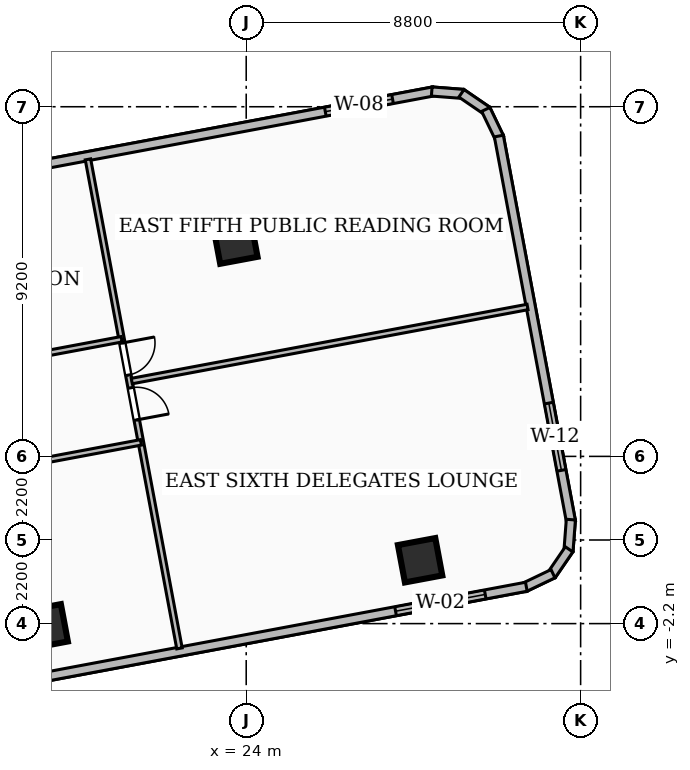
"""IFC4 building model, lengths in metres.
Left out: names, types, materials, properties, quantities, classifications, styles, units other than length and angle.
Written with IfcOpenShell. Run it as: python <this file> out.ifc"""

import sys

from ifc_helpers import new_model, si_unit, direction, frame, frame_2d, origin, origin_2d, place, context, subcontext, project, spatial, rectangle, extrude, element, fill, save


model = new_model("IFC4")
c1 = context("Model", 3, precision=1e-05, world=origin(), true_north=direction((0.0, 1.0)))
c2 = subcontext(c1, "Body", "Model", "MODEL_VIEW")
j1 = project(units=[si_unit("LENGTHUNIT", "METRE"), si_unit("PLANEANGLEUNIT", "RADIAN")], contexts=[c1])
p1 = place(None, origin())
s1 = spatial("IfcSite", under=j1, at=p1, CompositionType="ELEMENT")
p2 = place(p1, origin())
s2 = spatial("IfcBuilding", under=s1, at=p2, CompositionType="ELEMENT")
p3 = place(p2, frame((0.0, 0.0, 100.08)))
s3 = spatial("IfcBuildingStorey", under=s2, at=p3, CompositionType="ELEMENT", Elevation=100.08)
for number, where, z_axis, x_axis in (
    (1, (18.724, -2.271, 0.0), (0.0, 0.0, 1.0), (0.983, 0.184, 0.0)),
    (2, (28.576, -0.533, 0.0), (0.0, 0.0, 1.0), (0.983, 0.184, 0.0)),
    (3, (23.715, 7.851, 0.0), (0.0, 0.0, 1.0), (0.983, 0.184, 0.0)),
):
    element("IfcColumn", number, at=place(p3, frame(where, z_axis=z_axis, x_axis=x_axis)), inside=s3, PredefinedType="COLUMN", context=c2, shape_type="SweptSolid", body=[
        extrude(rectangle(XDim=1.0, YDim=1.0, at=origin_2d()), origin(), (0.0, 0.0, 1.0), 3.6),
    ])
p4 = place(p3, frame((12.935, 8.809, 0.0), z_axis=(0.0, 0.0, 1.0), x_axis=(0.982922588066, 0.184019525782, 0.0)))
e4 = element("IfcWall", 4, at=p4, inside=s3, PredefinedType="SOLIDWALL", context=c2, shape_type="SweptSolid", body=[
    extrude(rectangle(XDim=16.275, YDim=0.24, at=frame_2d((8.137, 0.0))), origin(), (0.0, 0.0, 1.0), 3.34),
])
p5 = place(p4, frame((13.375, 0.0, 0.85)))
e5 = element("IfcOpeningElement", 5, at=p5, cuts=e4, PredefinedType="OPENING", context=c2, shape_type="SweptSolid", body=[
    extrude(rectangle(XDim=1.8, YDim=1.8, at=frame_2d((0.9, 0.9))), frame((0.0, 0.13, 0.0), z_axis=(0.0, -1.0, 0.0), x_axis=(1.0, 0.0, 0.0)), (0.0, 0.0, 1.0), 0.26),
])
p6 = place(p3, frame((28.882, 11.801, 0.0), z_axis=(0.0, 0.0, 1.0), x_axis=(0.997028485347, -0.077033754987, 0.0)))
e6 = element("IfcWall", 6, at=p6, inside=s3, PredefinedType="SOLIDWALL", context=c2, shape_type="SweptSolid", body=[
    extrude(rectangle(XDim=0.83, YDim=0.24, at=frame_2d((0.415, 0.0))), origin(), (0.0, 0.0, 1.0), 3.34),
])
p7 = place(p3, frame((29.664, 11.753, 0.0), z_axis=(0.0, 0.0, 1.0), x_axis=(0.825160141847, -0.564898876177, 0.0)))
e7 = element("IfcWall", 7, at=p7, inside=s3, PredefinedType="SOLIDWALL", context=c2, shape_type="SweptSolid", body=[
    extrude(rectangle(XDim=0.814, YDim=0.24, at=frame_2d((0.407, 0.0))), origin(), (0.0, 0.0, 1.0), 3.34),
])
p8 = place(p3, frame((30.304, 11.33, 0.0), z_axis=(0.0, 0.0, 1.0), x_axis=(0.433294434868, -0.901252424525, 0.0)))
e8 = element("IfcWall", 8, at=p8, inside=s3, PredefinedType="SOLIDWALL", context=c2, shape_type="SweptSolid", body=[
    extrude(rectangle(XDim=0.831, YDim=0.24, at=frame_2d((0.416, 0.0))), origin(), (0.0, 0.0, 1.0), 3.34),
])
p9 = place(p3, frame((30.648, 10.629, 0.0), z_axis=(0.0, 0.0, 1.0), x_axis=(0.183929967783, -0.982939350597, 0.0)))
e9 = element("IfcWall", 9, at=p9, inside=s3, PredefinedType="SOLIDWALL", context=c2, shape_type="SweptSolid", body=[
    extrude(rectangle(XDim=10.319, YDim=0.24, at=frame_2d((5.159, 0.0))), origin(), (0.0, 0.0, 1.0), 3.34),
])
p10 = place(p9, frame((7.149, 0.0, 0.85)))
e10 = element("IfcOpeningElement", 10, at=p10, cuts=e9, PredefinedType="OPENING", context=c2, shape_type="SweptSolid", body=[
    extrude(rectangle(XDim=1.8, YDim=1.6, at=frame_2d((0.9, 0.8))), frame((0.0, 0.13, 0.0), z_axis=(0.0, -1.0, 0.0), x_axis=(1.0, 0.0, 0.0)), (0.0, 0.0, 1.0), 0.26),
])
p11 = place(p3, frame((32.543, 0.536, 0.0), z_axis=(0.0, 0.0, 1.0), x_axis=(-0.07586448817, -0.997118137151, 0.0)))
e11 = element("IfcWall", 11, at=p11, inside=s3, PredefinedType="SOLIDWALL", context=c2, shape_type="SweptSolid", body=[
    extrude(rectangle(XDim=0.83, YDim=0.24, at=frame_2d((0.415, 0.0))), origin(), (0.0, 0.0, 1.0), 3.34),
])
p12 = place(p3, frame((32.496, -0.246, 0.0), z_axis=(0.0, 0.0, 1.0), x_axis=(-0.56454433247, -0.825402748163, 0.0)))
e12 = element("IfcWall", 12, at=p12, inside=s3, PredefinedType="SOLIDWALL", context=c2, shape_type="SweptSolid", body=[
    extrude(rectangle(XDim=0.815, YDim=0.24, at=frame_2d((0.408, 0.0))), origin(), (0.0, 0.0, 1.0), 3.34),
])
p13 = place(p3, frame((32.073, -0.887, 0.0), z_axis=(0.0, 0.0, 1.0), x_axis=(-0.901930409836, -0.431881390908, 0.0)))
e13 = element("IfcWall", 13, at=p13, inside=s3, PredefinedType="SOLIDWALL", context=c2, shape_type="SweptSolid", body=[
    extrude(rectangle(XDim=0.832, YDim=0.24, at=frame_2d((0.416, 0.0))), origin(), (0.0, 0.0, 1.0), 3.34),
])
p14 = place(p3, frame((31.371, -1.23, 0.0), z_axis=(0.0, 0.0, 1.0), x_axis=(-0.982920382654, -0.18403130539, 0.0)))
e14 = element("IfcWall", 14, at=p14, inside=s3, PredefinedType="SOLIDWALL", context=c2, shape_type="SweptSolid", body=[
    extrude(rectangle(XDim=16.275, YDim=0.24, at=frame_2d((8.138, 0.0))), origin(), (0.0, 0.0, 1.0), 3.34),
])
p15 = place(p14, frame((1.1, 0.0, 0.85)))
e15 = element("IfcOpeningElement", 15, at=p15, cuts=e14, PredefinedType="OPENING", context=c2, shape_type="SweptSolid", body=[
    extrude(rectangle(XDim=2.4, YDim=2.1, at=frame_2d((1.2, 1.05))), frame((0.0, 0.13, 0.0), z_axis=(0.0, -1.0, 0.0), x_axis=(1.0, 0.0, 0.0)), (0.0, 0.0, 1.0), 0.26),
])
p16 = place(p3, frame((20.722, 5.282, 0.0), z_axis=(0.0, 0.0, 1.0), x_axis=(-0.982936027627, -0.183947725163, 0.0)))
e16 = element("IfcWall", 16, at=p16, inside=s3, PredefinedType="PARTITIONING", context=c2, shape_type="SweptSolid", body=[
    extrude(rectangle(XDim=7.05, YDim=0.145, at=frame_2d((3.525, 0.0))), origin(), (0.0, 0.0, 1.0), 3.34),
])
p17 = place(p16, frame((3.075, 0.0, 0.0)))
e17 = element("IfcOpeningElement", 17, at=p17, cuts=e16, PredefinedType="OPENING", context=c2, shape_type="SweptSolid", body=[
    extrude(rectangle(XDim=0.95, YDim=2.08, at=frame_2d((0.475, 1.04))), frame((0.0, 0.083, 0.0), z_axis=(0.0, -1.0, 0.0), x_axis=(1.0, 0.0, 0.0)), (0.0, 0.0, 1.0), 0.165),
])
p18 = place(p3, frame((14.3, 1.272, 0.0), z_axis=(0.0, 0.0, 1.0), x_axis=(0.98292976592, 0.183981181833, 0.0)))
e18 = element("IfcWall", 18, at=p18, inside=s3, PredefinedType="PARTITIONING", context=c2, shape_type="SweptSolid", body=[
    extrude(rectangle(XDim=7.05, YDim=0.145, at=frame_2d((3.525, 0.0))), origin(), (0.0, 0.0, 1.0), 3.34),
])
p19 = place(p18, frame((3.075, 0.0, 0.0)))
e19 = element("IfcOpeningElement", 19, at=p19, cuts=e18, PredefinedType="OPENING", context=c2, shape_type="SweptSolid", body=[
    extrude(rectangle(XDim=0.95, YDim=2.08, at=frame_2d((0.475, 1.04))), frame((0.0, 0.083, 0.0), z_axis=(0.0, -1.0, 0.0), x_axis=(1.0, 0.0, 0.0)), (0.0, 0.0, 1.0), 0.165),
])
p20 = place(p3, frame((20.989, 4.182, 0.0), z_axis=(0.0, 0.0, 1.0), x_axis=(0.982930571593, 0.183976877429, 0.0)))
e20 = element("IfcWall", 20, at=p20, inside=s3, PredefinedType="PARTITIONING", context=c2, shape_type="SweptSolid", body=[
    extrude(rectangle(XDim=10.595, YDim=0.145, at=frame_2d((5.297, 0.0))), origin(), (0.0, 0.0, 1.0), 2.832),
])
p21 = place(p3, frame((19.836, 10.015, 0.0), z_axis=(0.0, 0.0, 1.0), x_axis=(0.183949578206, -0.982935680845, 0.0)))
e21 = element("IfcWall", 21, at=p21, inside=s3, PredefinedType="PARTITIONING", context=c2, shape_type="SweptSolid", body=[
    extrude(rectangle(XDim=13.09, YDim=0.145, at=frame_2d((6.545, 0.0))), origin(), (0.0, 0.0, 1.0), 2.486),
])
p22 = place(p21, frame((6.115, 0.0, 0.0)))
e22 = element("IfcOpeningElement", 22, at=p22, cuts=e21, PredefinedType="OPENING", context=c2, shape_type="SweptSolid", body=[
    extrude(rectangle(XDim=0.86, YDim=2.04, at=frame_2d((0.43, 1.02))), frame((0.0, 0.083, 0.0), z_axis=(0.0, -1.0, 0.0), x_axis=(1.0, 0.0, 0.0)), (0.0, 0.0, 1.0), 0.165),
])
p23 = place(p21, frame((4.915, 0.0, 0.0)))
e23 = element("IfcOpeningElement", 23, at=p23, cuts=e21, PredefinedType="OPENING", context=c2, shape_type="SweptSolid", body=[
    extrude(rectangle(XDim=0.86, YDim=2.04, at=frame_2d((0.43, 1.02))), frame((0.0, 0.083, 0.0), z_axis=(0.0, -1.0, 0.0), x_axis=(1.0, 0.0, 0.0)), (0.0, 0.0, 1.0), 0.165),
])
p24 = place(p5, origin())
e24 = element("IfcWindow", 24, at=p24, inside=s3, PartitioningType="SINGLE_PANEL", PredefinedType="WINDOW", context=c2, shape_type="SweptSolid", body=[
    extrude(rectangle(XDim=1.8, YDim=1.8, at=frame_2d((0.9, 0.9))), frame((0.0, 0.03, 0.0), z_axis=(0.0, -1.0, 0.0), x_axis=(1.0, 0.0, 0.0)), (0.0, 0.0, 1.0), 0.06),
])
fill(e5, e24)
p25 = place(p10, origin())
e25 = element("IfcWindow", 25, at=p25, inside=s3, PartitioningType="SINGLE_PANEL", PredefinedType="WINDOW", context=c2, shape_type="SweptSolid", body=[
    extrude(rectangle(XDim=1.8, YDim=1.6, at=frame_2d((0.9, 0.8))), frame((0.0, 0.03, 0.0), z_axis=(0.0, -1.0, 0.0), x_axis=(1.0, 0.0, 0.0)), (0.0, 0.0, 1.0), 0.06),
])
fill(e10, e25)
p26 = place(p15, origin())
e26 = element("IfcWindow", 26, at=p26, inside=s3, PartitioningType="SINGLE_PANEL", PredefinedType="WINDOW", context=c2, shape_type="SweptSolid", body=[
    extrude(rectangle(XDim=2.4, YDim=2.1, at=frame_2d((1.2, 1.05))), frame((0.0, 0.03, 0.0), z_axis=(0.0, -1.0, 0.0), x_axis=(1.0, 0.0, 0.0)), (0.0, 0.0, 1.0), 0.06),
])
fill(e15, e26)
p27 = place(p22, origin())
e27 = element("IfcDoor", 27, at=p27, inside=s3, OperationType="SINGLE_SWING_RIGHT", PredefinedType="DOOR", context=c2, shape_type="SweptSolid", body=[
    extrude(rectangle(XDim=0.86, YDim=2.04, at=frame_2d((0.43, 1.02))), frame((0.0, 0.025, 0.0), z_axis=(0.0, -1.0, 0.0), x_axis=(1.0, 0.0, 0.0)), (0.0, 0.0, 1.0), 0.05),
])
fill(e22, e27)
p28 = place(p23, origin())
e28 = element("IfcDoor", 28, at=p28, inside=s3, OperationType="SINGLE_SWING_LEFT", PredefinedType="DOOR", context=c2, shape_type="SweptSolid", body=[
    extrude(rectangle(XDim=0.86, YDim=2.04, at=frame_2d((0.43, 1.02))), frame((0.0, 0.025, 0.0), z_axis=(0.0, -1.0, 0.0), x_axis=(1.0, 0.0, 0.0)), (0.0, 0.0, 1.0), 0.05),
])
fill(e23, e28)
save(model, sys.argv[1])
